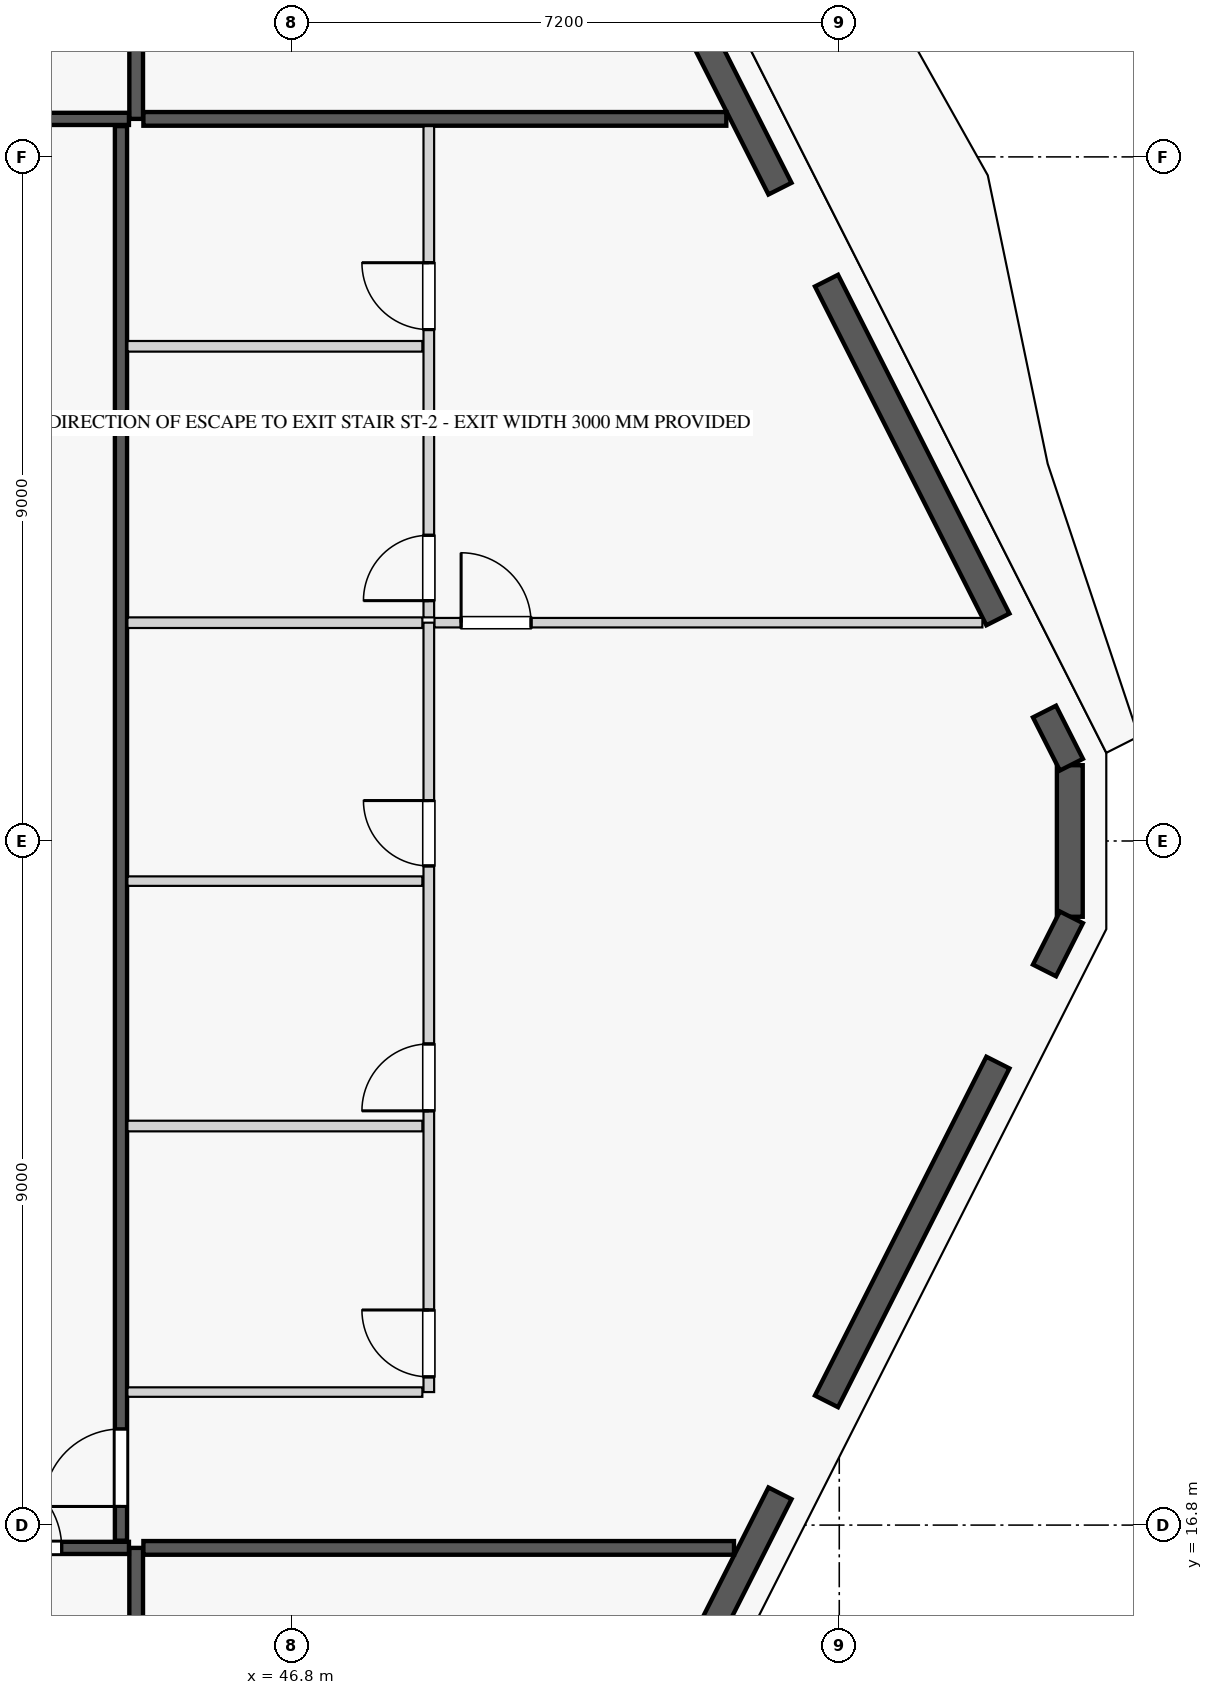
"""IFC4 building model, lengths in metres.
Left out: names, types, materials, properties, quantities, classifications, styles, units other than length and angle.
Written with IfcOpenShell. Run it as: python <this file> out.ifc"""

import sys

from ifc_helpers import new_model, si_unit, direction, frame, frame_2d, origin, origin_2d, place, context, subcontext, project, spatial, rectangle, extrude, element, fill, save


model = new_model("IFC4")
c1 = context("Model", 3, precision=1e-05, world=origin(), true_north=direction((0.0, 1.0)))
c2 = subcontext(c1, "Body", "Model", "MODEL_VIEW")
j1 = project(units=[si_unit("LENGTHUNIT", "METRE"), si_unit("PLANEANGLEUNIT", "RADIAN")], contexts=[c1])
p1 = place(None, origin())
s1 = spatial("IfcSite", under=j1, at=p1, CompositionType="ELEMENT")
p2 = place(p1, origin())
s2 = spatial("IfcBuilding", under=s1, at=p2, CompositionType="ELEMENT")
p3 = place(p2, frame((0.0, 0.0, 112.6)))
s3 = spatial("IfcBuildingStorey", under=s2, at=p3, CompositionType="ELEMENT", Elevation=112.6)
for number, where, z_axis, x_axis in (
    (1, (53.452, 17.824, 0.0), (0.0, 0.0, 1.0), (1.0, 0.0, 0.0)),
    (2, (56.357, 23.491, 0.0), (0.0, 0.0, 1.0), (1.0, 0.0, 0.0)),
    (3, (56.357, 28.109, 0.0), (0.0, 0.0, 1.0), (1.0, 0.0, 0.0)),
    (4, (53.452, 33.776, 0.0), (0.0, 0.0, 1.0), (1.0, 0.0, 0.0)),
):
    element("IfcColumn", number, at=place(p3, frame(where, z_axis=z_axis, x_axis=x_axis)), inside=s3, PredefinedType="COLUMN", context=c2, shape_type="SweptSolid", body=[
        extrude(rectangle(XDim=1.05, YDim=1.05, at=origin_2d()), origin(), (0.0, 0.0, 1.0), 3.55),
    ])
p4 = place(p3, frame((56.357, 25.8, 0.0), z_axis=(0.0, 0.0, 1.0), x_axis=(0.0, 1.0, 0.0)))
e5 = element("IfcColumn", 5, at=p4, inside=s3, PredefinedType="PILASTER", context=c2, shape_type="SweptSolid", body=[
    extrude(rectangle(XDim=0.5, YDim=0.35, at=origin_2d()), origin(), (0.0, 0.0, 1.0), 3.55),
])
p5 = place(p3, frame((57.033, 24.803, 0.0), z_axis=(0.0, 0.0, 1.0), x_axis=(0.0, 1.0, 0.0)))
e6 = element("IfcWall", 6, at=p5, inside=s3, PredefinedType="STANDARD", context=c2, shape_type="SweptSolid", body=[
    extrude(rectangle(XDim=1.994, YDim=0.34, at=frame_2d((0.997, 0.0))), origin(), (0.0, 0.0, 1.0), 3.34),
])
p6 = place(p3, frame((50.863, 12.561, 0.0), z_axis=(0.0, 0.0, 1.0), x_axis=(0.451567731634, 0.892236842855, 0.0)))
e7 = element("IfcWall", 7, at=p6, inside=s3, PredefinedType="STANDARD", context=c2, shape_type="SweptSolid", body=[
    extrude(rectangle(XDim=5.219, YDim=0.34, at=frame_2d((2.61, 0.0))), origin(), (0.0, 0.0, 1.0), 2.797),
])
p7 = place(p6, frame((2.06, 0.0, 0.75)))
e8 = element("IfcOpeningElement", 8, at=p7, cuts=e7, PredefinedType="OPENING", context=c2, shape_type="SweptSolid", body=[
    extrude(rectangle(XDim=1.1, YDim=1.897, at=frame_2d((0.55, 0.948))), frame((0.0, 0.18, 0.0), z_axis=(0.0, -1.0, 0.0), x_axis=(1.0, 0.0, 0.0)), (0.0, 0.0, 1.0), 0.36),
])
p8 = place(p3, frame((53.832, 18.428, 0.0), z_axis=(0.0, 0.0, 1.0), x_axis=(0.451431617681, 0.892305718102, 0.0)))
e9 = element("IfcWall", 9, at=p8, inside=s3, PredefinedType="STANDARD", context=c2, shape_type="SweptSolid", body=[
    extrude(rectangle(XDim=4.995, YDim=0.34, at=frame_2d((2.498, 0.0))), origin(), (0.0, 0.0, 1.0), 2.797),
])
p9 = place(p8, frame((1.947, 0.0, 0.75)))
e10 = element("IfcOpeningElement", 10, at=p9, cuts=e9, PredefinedType="OPENING", context=c2, shape_type="SweptSolid", body=[
    extrude(rectangle(XDim=1.1, YDim=1.897, at=frame_2d((0.55, 0.948))), frame((0.0, 0.18, 0.0), z_axis=(0.0, -1.0, 0.0), x_axis=(1.0, 0.0, 0.0)), (0.0, 0.0, 1.0), 0.36),
])
for number, where, z_axis, x_axis in (
    (11, (56.7, 24.097, 0.0), (0.0, 0.0, 1.0), (0.452, 0.892, 0.0)),
    (12, (57.054, 26.804, 0.0), (0.0, 0.0, 1.0), (-0.452, 0.892, 0.0)),
):
    element("IfcWall", number, at=place(p3, frame(where, z_axis=z_axis, x_axis=x_axis)), inside=s3, PredefinedType="STANDARD", context=c2, shape_type="SweptSolid", body=[
        extrude(rectangle(XDim=0.783, YDim=0.34, at=frame_2d((0.392, 0.0))), origin(), (0.0, 0.0, 1.0), 3.34),
    ])
p10 = place(p3, frame((56.087, 28.715, 0.0), z_axis=(0.0, 0.0, 1.0), x_axis=(-0.451431617681, 0.892305718102, 0.0)))
e13 = element("IfcWall", 13, at=p10, inside=s3, PredefinedType="STANDARD", context=c2, shape_type="SweptSolid", body=[
    extrude(rectangle(XDim=4.995, YDim=0.34, at=frame_2d((2.498, 0.0))), origin(), (0.0, 0.0, 1.0), 2.797),
])
p11 = place(p10, frame((1.947, 0.0, 0.75)))
e14 = element("IfcOpeningElement", 14, at=p11, cuts=e13, PredefinedType="OPENING", context=c2, shape_type="SweptSolid", body=[
    extrude(rectangle(XDim=1.1, YDim=1.897, at=frame_2d((0.55, 0.948))), frame((0.0, 0.18, 0.0), z_axis=(0.0, -1.0, 0.0), x_axis=(1.0, 0.0, 0.0)), (0.0, 0.0, 1.0), 0.36),
])
p12 = place(p3, frame((53.22, 34.382, 0.0), z_axis=(0.0, 0.0, 1.0), x_axis=(-0.451567731634, 0.892236842855, 0.0)))
e15 = element("IfcWall", 15, at=p12, inside=s3, PredefinedType="STANDARD", context=c2, shape_type="SweptSolid", body=[
    extrude(rectangle(XDim=5.219, YDim=0.34, at=frame_2d((2.61, 0.0))), origin(), (0.0, 0.0, 1.0), 2.797),
])
p13 = place(p12, frame((2.699, 0.0, 0.0)))
e16 = element("IfcOpeningElement", 16, at=p13, cuts=e15, PredefinedType="OPENING", context=c2, shape_type="SweptSolid", body=[
    extrude(rectangle(XDim=1.1, YDim=2.25, at=frame_2d((0.55, 1.125))), frame((0.0, 0.18, 0.0), z_axis=(0.0, -1.0, 0.0), x_axis=(1.0, 0.0, 0.0)), (0.0, 0.0, 1.0), 0.36),
])
p14 = place(p3, frame((44.75, 4.105, 0.0), z_axis=(0.0, 0.0, 1.0), x_axis=(0.0, 1.0, 0.0)))
e17 = element("IfcWall", 17, at=p14, inside=s3, PredefinedType="PARTITIONING", context=c2, shape_type="SweptSolid", body=[
    extrude(rectangle(XDim=12.395, YDim=0.18, at=frame_2d((6.198, 0.0))), origin(), (0.0, 0.0, 1.0), 3.34),
])
p15 = place(p3, frame((28.663, 16.5, 0.0), z_axis=(0.0, 0.0, 1.0), x_axis=(1.0, 0.0, 0.0)))
e18 = element("IfcWall", 18, at=p15, inside=s3, PredefinedType="PARTITIONING", context=c2, shape_type="SweptSolid", body=[
    extrude(rectangle(XDim=15.992, YDim=0.16, at=frame_2d((7.996, 0.0))), origin(), (0.0, 0.0, 1.0), 3.34),
])
p16 = place(p15, frame((14.087, 0.0, 0.0)))
e19 = element("IfcOpeningElement", 19, at=p16, cuts=e18, PredefinedType="OPENING", context=c2, shape_type="SweptSolid", body=[
    extrude(rectangle(XDim=1.02, YDim=2.25, at=frame_2d((0.51, 1.125))), frame((0.0, 0.09, 0.0), z_axis=(0.0, -1.0, 0.0), x_axis=(1.0, 0.0, 0.0)), (0.0, 0.0, 1.0), 0.18),
])
p17 = place(p3, frame((44.75, 35.3, 0.0), z_axis=(0.0, 0.0, 1.0), x_axis=(0.0, 1.0, 0.0)))
e20 = element("IfcWall", 20, at=p17, inside=s3, PredefinedType="PARTITIONING", context=c2, shape_type="SweptSolid", body=[
    extrude(rectangle(XDim=12.195, YDim=0.18, at=frame_2d((6.098, 0.0))), origin(), (0.0, 0.0, 1.0), 3.34),
])
p18 = place(p3, frame((20.145, 35.3, 0.0), z_axis=(0.0, 0.0, 1.0), x_axis=(1.0, 0.0, 0.0)))
e21 = element("IfcWall", 21, at=p18, inside=s3, PredefinedType="PARTITIONING", context=c2, shape_type="SweptSolid", body=[
    extrude(rectangle(XDim=24.51, YDim=0.16, at=frame_2d((12.255, 0.0))), origin(), (0.0, 0.0, 1.0), 3.34),
])
p19 = place(p18, frame((0.405, 0.0, 0.0)))
e22 = element("IfcOpeningElement", 22, at=p19, cuts=e21, PredefinedType="OPENING", context=c2, shape_type="SweptSolid", body=[
    extrude(rectangle(XDim=1.35, YDim=2.35, at=frame_2d((0.675, 1.175))), frame((0.0, 0.09, 0.0), z_axis=(0.0, -1.0, 0.0), x_axis=(1.0, 0.0, 0.0)), (0.0, 0.0, 1.0), 0.18),
])
p20 = place(p3, frame((44.845, 16.5, 0.0), z_axis=(0.0, 0.0, 1.0), x_axis=(1.0, 0.0, 0.0)))
e23 = element("IfcWall", 23, at=p20, inside=s3, PredefinedType="PARTITIONING", context=c2, shape_type="SweptSolid", body=[
    extrude(rectangle(XDim=7.77, YDim=0.18, at=frame_2d((3.885, 0.0))), origin(), (0.0, 0.0, 1.0), 3.34),
])
p21 = place(p3, frame((44.845, 35.3, 0.0), z_axis=(0.0, 0.0, 1.0), x_axis=(1.0, 0.0, 0.0)))
e24 = element("IfcWall", 24, at=p21, inside=s3, PredefinedType="PARTITIONING", context=c2, shape_type="SweptSolid", body=[
    extrude(rectangle(XDim=7.669, YDim=0.18, at=frame_2d((3.834, 0.0))), origin(), (0.0, 0.0, 1.0), 3.34),
])
p22 = place(p3, frame((44.55, 16.595, 0.0), z_axis=(0.0, 0.0, 1.0), x_axis=(0.0, 1.0, 0.0)))
e25 = element("IfcWall", 25, at=p22, inside=s3, PredefinedType="PARTITIONING", context=c2, shape_type="SweptSolid", body=[
    extrude(rectangle(XDim=18.61, YDim=0.16, at=frame_2d((9.305, 0.0))), origin(), (0.0, 0.0, 1.0), 3.34),
])
p23 = place(p22, frame((0.45, 0.0, 0.0)))
e26 = element("IfcOpeningElement", 26, at=p23, cuts=e25, PredefinedType="OPENING", context=c2, shape_type="SweptSolid", body=[
    extrude(rectangle(XDim=1.02, YDim=2.25, at=frame_2d((0.51, 1.125))), frame((0.0, 0.09, 0.0), z_axis=(0.0, -1.0, 0.0), x_axis=(1.0, 0.0, 0.0)), (0.0, 0.0, 1.0), 0.18),
])
p24 = place(p3, frame((44.635, 18.55, 0.0), z_axis=(0.0, 0.0, 1.0), x_axis=(1.0, 0.0, 0.0)))
e27 = element("IfcWall", 27, at=p24, inside=s3, PredefinedType="PARTITIONING", context=c2, shape_type="SweptSolid", body=[
    extrude(rectangle(XDim=3.88, YDim=0.125, at=frame_2d((1.94, 0.0))), origin(), (0.0, 0.0, 1.0), 2.722),
])
p25 = place(p3, frame((48.6, 18.55, 0.0), z_axis=(0.0, 0.0, 1.0), x_axis=(0.0, 1.0, 0.0)))
e28 = element("IfcWall", 28, at=p25, inside=s3, PredefinedType="PLUMBINGWALL", context=c2, shape_type="SweptSolid", body=[
    extrude(rectangle(XDim=10.122, YDim=0.14, at=frame_2d((5.061, 0.0))), origin(), (0.0, 0.0, 1.0), 3.34),
])
p26 = place(p25, frame((0.2, 0.0, 0.0)))
e29 = element("IfcOpeningElement", 29, at=p26, cuts=e28, PredefinedType="OPENING", context=c2, shape_type="SweptSolid", body=[
    extrude(rectangle(XDim=0.88, YDim=2.15, at=frame_2d((0.44, 1.075))), frame((0.0, 0.08, 0.0), z_axis=(0.0, -1.0, 0.0), x_axis=(1.0, 0.0, 0.0)), (0.0, 0.0, 1.0), 0.16),
])
p27 = place(p25, frame((3.7, 0.0, 0.0)))
e30 = element("IfcOpeningElement", 30, at=p27, cuts=e28, PredefinedType="OPENING", context=c2, shape_type="SweptSolid", body=[
    extrude(rectangle(XDim=0.88, YDim=2.15, at=frame_2d((0.44, 1.075))), frame((0.0, 0.08, 0.0), z_axis=(0.0, -1.0, 0.0), x_axis=(1.0, 0.0, 0.0)), (0.0, 0.0, 1.0), 0.16),
])
p28 = place(p25, frame((6.922, 0.0, 0.0)))
e31 = element("IfcOpeningElement", 31, at=p28, cuts=e28, PredefinedType="OPENING", context=c2, shape_type="SweptSolid", body=[
    extrude(rectangle(XDim=0.86, YDim=2.1, at=frame_2d((0.43, 1.05))), frame((0.0, 0.08, 0.0), z_axis=(0.0, -1.0, 0.0), x_axis=(1.0, 0.0, 0.0)), (0.0, 0.0, 1.0), 0.16),
])
p29 = place(p3, frame((48.6, 28.742, 0.0), z_axis=(0.0, 0.0, 1.0), x_axis=(0.0, 1.0, 0.0)))
e32 = element("IfcWall", 32, at=p29, inside=s3, PredefinedType="PLUMBINGWALL", context=c2, shape_type="SweptSolid", body=[
    extrude(rectangle(XDim=6.463, YDim=0.14, at=frame_2d((3.231, 0.0))), origin(), (0.0, 0.0, 1.0), 3.34),
])
p30 = place(p29, frame((0.22, 0.0, 0.0)))
e33 = element("IfcOpeningElement", 33, at=p30, cuts=e32, PredefinedType="OPENING", context=c2, shape_type="SweptSolid", body=[
    extrude(rectangle(XDim=0.86, YDim=2.1, at=frame_2d((0.43, 1.05))), frame((0.0, 0.08, 0.0), z_axis=(0.0, -1.0, 0.0), x_axis=(1.0, 0.0, 0.0)), (0.0, 0.0, 1.0), 0.16),
])
p31 = place(p29, frame((3.786, 0.0, 0.0)))
e34 = element("IfcOpeningElement", 34, at=p31, cuts=e32, PredefinedType="OPENING", context=c2, shape_type="SweptSolid", body=[
    extrude(rectangle(XDim=0.88, YDim=2.15, at=frame_2d((0.44, 1.075))), frame((0.0, 0.08, 0.0), z_axis=(0.0, -1.0, 0.0), x_axis=(1.0, 0.0, 0.0)), (0.0, 0.0, 1.0), 0.16),
])
p32 = place(p3, frame((44.635, 28.672, 0.0), z_axis=(0.0, 0.0, 1.0), x_axis=(1.0, 0.0, 0.0)))
e35 = element("IfcWall", 35, at=p32, inside=s3, PredefinedType="PLUMBINGWALL", context=c2, shape_type="SweptSolid", body=[
    extrude(rectangle(XDim=3.88, YDim=0.14, at=frame_2d((1.94, 0.0))), origin(), (0.0, 0.0, 1.0), 3.34),
])
p33 = place(p3, frame((48.675, 28.672, 0.0), z_axis=(0.0, 0.0, 1.0), x_axis=(1.0, 0.0, 0.0)))
e36 = element("IfcWall", 36, at=p33, inside=s3, PredefinedType="PARTITIONING", context=c2, shape_type="SweptSolid", body=[
    extrude(rectangle(XDim=7.208, YDim=0.125, at=frame_2d((3.604, 0.0))), origin(), (0.0, 0.0, 1.0), 3.34),
])
p34 = place(p33, frame((0.35, 0.0, 0.0)))
e37 = element("IfcOpeningElement", 37, at=p34, cuts=e36, PredefinedType="OPENING", context=c2, shape_type="SweptSolid", body=[
    extrude(rectangle(XDim=0.92, YDim=2.15, at=frame_2d((0.46, 1.075))), frame((0.0, 0.073, 0.0), z_axis=(0.0, -1.0, 0.0), x_axis=(1.0, 0.0, 0.0)), (0.0, 0.0, 1.0), 0.145),
])
p35 = place(p3, frame((44.635, 22.05, 0.0), z_axis=(0.0, 0.0, 1.0), x_axis=(1.0, 0.0, 0.0)))
e38 = element("IfcWall", 38, at=p35, inside=s3, PredefinedType="PLUMBINGWALL", context=c2, shape_type="SweptSolid", body=[
    extrude(rectangle(XDim=3.88, YDim=0.14, at=frame_2d((1.94, 0.0))), origin(), (0.0, 0.0, 1.0), 3.34),
])
p36 = place(p3, frame((44.635, 25.272, 0.0), z_axis=(0.0, 0.0, 1.0), x_axis=(1.0, 0.0, 0.0)))
e39 = element("IfcWall", 39, at=p36, inside=s3, PredefinedType="PARTITIONING", context=c2, shape_type="SweptSolid", body=[
    extrude(rectangle(XDim=3.88, YDim=0.125, at=frame_2d((1.94, 0.0))), origin(), (0.0, 0.0, 1.0), 3.34),
])
p37 = place(p3, frame((44.635, 32.308, 0.0), z_axis=(0.0, 0.0, 1.0), x_axis=(1.0, 0.0, 0.0)))
e40 = element("IfcWall", 40, at=p37, inside=s3, PredefinedType="PLUMBINGWALL", context=c2, shape_type="SweptSolid", body=[
    extrude(rectangle(XDim=3.88, YDim=0.14, at=frame_2d((1.94, 0.0))), origin(), (0.0, 0.0, 1.0), 3.34),
])
p38 = place(p9, origin())
e41 = element("IfcWindow", 41, at=p38, inside=s3, PartitioningType="SINGLE_PANEL", PredefinedType="WINDOW", context=c2, shape_type="SweptSolid", body=[
    extrude(rectangle(XDim=1.1, YDim=1.897, at=frame_2d((0.55, 0.948))), frame((0.0, 0.03, 0.0), z_axis=(0.0, -1.0, 0.0), x_axis=(1.0, 0.0, 0.0)), (0.0, 0.0, 1.0), 0.06),
])
fill(e10, e41)
p39 = place(p11, origin())
e42 = element("IfcWindow", 42, at=p39, inside=s3, PartitioningType="SINGLE_PANEL", PredefinedType="WINDOW", context=c2, shape_type="SweptSolid", body=[
    extrude(rectangle(XDim=1.1, YDim=1.897, at=frame_2d((0.55, 0.948))), frame((0.0, 0.03, 0.0), z_axis=(0.0, -1.0, 0.0), x_axis=(1.0, 0.0, 0.0)), (0.0, 0.0, 1.0), 0.06),
])
fill(e14, e42)
p40 = place(p16, origin())
e43 = element("IfcDoor", 43, at=p40, inside=s3, OperationType="SINGLE_SWING_LEFT", PredefinedType="DOOR", context=c2, shape_type="SweptSolid", body=[
    extrude(rectangle(XDim=1.02, YDim=2.25, at=frame_2d((0.51, 1.125))), frame((0.0, 0.025, 0.0), z_axis=(0.0, -1.0, 0.0), x_axis=(1.0, 0.0, 0.0)), (0.0, 0.0, 1.0), 0.05),
])
fill(e19, e43)
p41 = place(p26, origin())
e44 = element("IfcDoor", 44, at=p41, inside=s3, OperationType="SINGLE_SWING_RIGHT", PredefinedType="DOOR", context=c2, shape_type="SweptSolid", body=[
    extrude(rectangle(XDim=0.88, YDim=2.15, at=frame_2d((0.44, 1.075))), frame((0.0, 0.025, 0.0), z_axis=(0.0, -1.0, 0.0), x_axis=(1.0, 0.0, 0.0)), (0.0, 0.0, 1.0), 0.05),
])
fill(e29, e44)
p42 = place(p27, origin())
e45 = element("IfcDoor", 45, at=p42, inside=s3, OperationType="SINGLE_SWING_LEFT", PredefinedType="DOOR", context=c2, shape_type="SweptSolid", body=[
    extrude(rectangle(XDim=0.88, YDim=2.15, at=frame_2d((0.44, 1.075))), frame((0.0, 0.025, 0.0), z_axis=(0.0, -1.0, 0.0), x_axis=(1.0, 0.0, 0.0)), (0.0, 0.0, 1.0), 0.05),
])
fill(e30, e45)
p43 = place(p28, origin())
e46 = element("IfcDoor", 46, at=p43, inside=s3, OperationType="SINGLE_SWING_RIGHT", PredefinedType="DOOR", context=c2, shape_type="SweptSolid", body=[
    extrude(rectangle(XDim=0.86, YDim=2.1, at=frame_2d((0.43, 1.05))), frame((0.0, 0.025, 0.0), z_axis=(0.0, -1.0, 0.0), x_axis=(1.0, 0.0, 0.0)), (0.0, 0.0, 1.0), 0.05),
])
fill(e31, e46)
p44 = place(p30, origin())
e47 = element("IfcDoor", 47, at=p44, inside=s3, OperationType="SINGLE_SWING_LEFT", PredefinedType="DOOR", context=c2, shape_type="SweptSolid", body=[
    extrude(rectangle(XDim=0.86, YDim=2.1, at=frame_2d((0.43, 1.05))), frame((0.0, 0.025, 0.0), z_axis=(0.0, -1.0, 0.0), x_axis=(1.0, 0.0, 0.0)), (0.0, 0.0, 1.0), 0.05),
])
fill(e33, e47)
p45 = place(p31, origin())
e48 = element("IfcDoor", 48, at=p45, inside=s3, OperationType="SINGLE_SWING_RIGHT", PredefinedType="DOOR", context=c2, shape_type="SweptSolid", body=[
    extrude(rectangle(XDim=0.88, YDim=2.15, at=frame_2d((0.44, 1.075))), frame((0.0, 0.025, 0.0), z_axis=(0.0, -1.0, 0.0), x_axis=(1.0, 0.0, 0.0)), (0.0, 0.0, 1.0), 0.05),
])
fill(e34, e48)
p46 = place(p23, origin())
e49 = element("IfcDoor", 49, at=p46, inside=s3, OperationType="SINGLE_SWING_LEFT", PredefinedType="DOOR", context=c2, shape_type="SweptSolid", body=[
    extrude(rectangle(XDim=1.02, YDim=2.25, at=frame_2d((0.51, 1.125))), frame((0.0, 0.025, 0.0), z_axis=(0.0, -1.0, 0.0), x_axis=(1.0, 0.0, 0.0)), (0.0, 0.0, 1.0), 0.05),
])
fill(e26, e49)
p47 = place(p34, origin())
e50 = element("IfcDoor", 50, at=p47, inside=s3, OperationType="SINGLE_SWING_LEFT", PredefinedType="DOOR", context=c2, shape_type="SweptSolid", body=[
    extrude(rectangle(XDim=0.92, YDim=2.15, at=frame_2d((0.46, 1.075))), frame((0.0, 0.025, 0.0), z_axis=(0.0, -1.0, 0.0), x_axis=(1.0, 0.0, 0.0)), (0.0, 0.0, 1.0), 0.05),
])
fill(e37, e50)
save(model, sys.argv[1])
